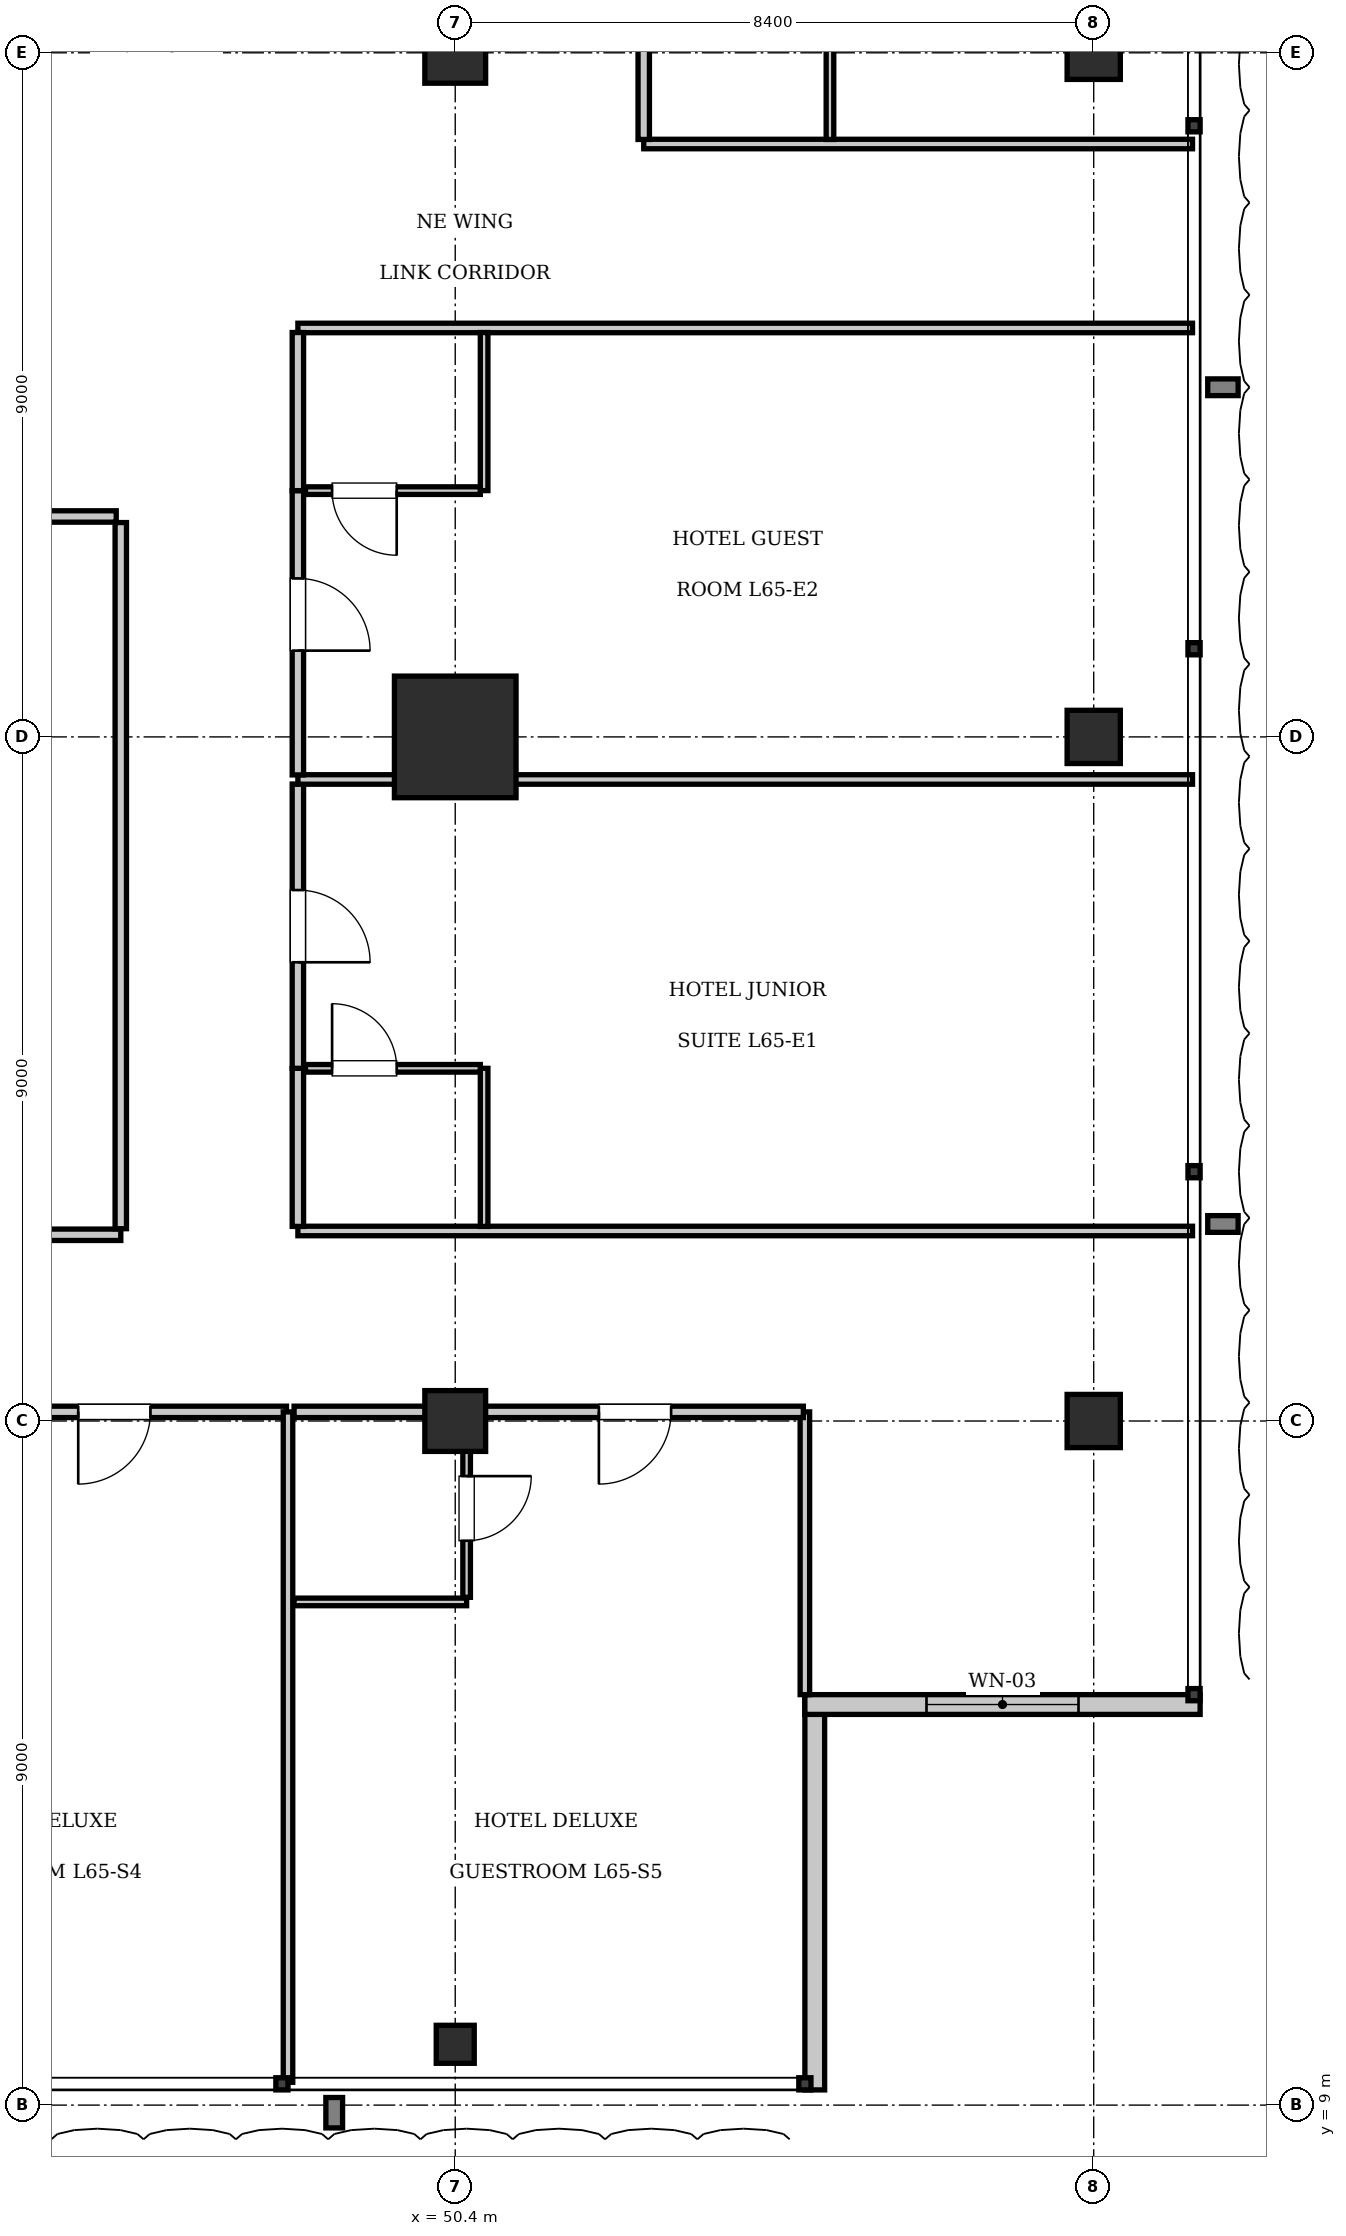
"""IFC4 building model, lengths in metres.
Left out: names, types, materials, properties, quantities, classifications, styles, units other than length and angle.
Written with IfcOpenShell. Run it as: python <this file> out.ifc"""

import sys

from ifc_helpers import new_model, si_unit, direction, frame, frame_2d, origin, origin_2d, place, context, subcontext, project, spatial, rectangle, i_section, extrude, element, fill, save


model = new_model("IFC4")
c1 = context("Model", 3, precision=1e-05, world=origin(), true_north=direction((0.0, 1.0)))
c2 = subcontext(c1, "Body", "Model", "MODEL_VIEW")
j1 = project(units=[si_unit("LENGTHUNIT", "METRE"), si_unit("PLANEANGLEUNIT", "RADIAN")], contexts=[c1])
p1 = place(None, origin())
s1 = spatial("IfcSite", under=j1, at=p1, CompositionType="ELEMENT")
p2 = place(p1, origin())
s2 = spatial("IfcBuilding", under=s1, at=p2, CompositionType="ELEMENT")
p3 = place(p2, frame((0.0, 0.0, 266.35)))
s3 = spatial("IfcBuildingStorey", under=s2, at=p3, CompositionType="ELEMENT", Elevation=266.35)
p4 = place(p3, frame((50.4, 27.0, 0.0), z_axis=(0.0, 0.0, 1.0), x_axis=(1.0, 0.0, 0.0)))
e1 = element("IfcColumn", 1, at=p4, inside=s3, PredefinedType="COLUMN", context=c2, shape_type="SweptSolid", body=[
    extrude(rectangle(XDim=1.6, YDim=1.6, at=origin_2d()), origin(), (0.0, 0.0, 1.0), 3.85),
])
for number, where, z_axis, x_axis in (
    (2, (50.4, 36.0, 0.0), (0.0, 0.0, 1.0), (1.0, 0.0, 0.0)),
    (3, (50.4, 18.0, 0.0), (0.0, 0.0, 1.0), (1.0, 0.0, 0.0)),
):
    element("IfcColumn", number, at=place(p3, frame(where, z_axis=z_axis, x_axis=x_axis)), inside=s3, PredefinedType="COLUMN", context=c2, shape_type="SweptSolid", body=[
        extrude(rectangle(XDim=0.8, YDim=0.8, at=origin_2d()), origin(), (0.0, 0.0, 1.0), 3.85),
    ])
for number, where, z_axis, x_axis in (
    (4, (58.8, 18.0, 0.0), (0.0, 0.0, 1.0), (1.0, 0.0, 0.0)),
    (5, (58.8, 27.0, 0.0), (0.0, 0.0, 1.0), (1.0, 0.0, 0.0)),
    (6, (58.8, 36.0, 0.0), (0.0, 0.0, 1.0), (1.0, 0.0, 0.0)),
):
    element("IfcColumn", number, at=place(p3, frame(where, z_axis=z_axis, x_axis=x_axis)), inside=s3, PredefinedType="COLUMN", context=c2, shape_type="SweptSolid", body=[
        extrude(rectangle(XDim=0.7, YDim=0.7, at=origin_2d()), origin(), (0.0, 0.0, 1.0), 3.85),
    ])
p5 = place(p3, frame((50.4, 9.8, 0.0), z_axis=(0.0, 0.0, 1.0), x_axis=(1.0, 0.0, 0.0)))
e7 = element("IfcColumn", 7, at=p5, inside=s3, PredefinedType="COLUMN", context=c2, shape_type="SweptSolid", body=[
    extrude(i_section(OverallWidth=0.5, OverallDepth=0.5, WebThickness=0.022, FlangeThickness=0.032, at=origin_2d()), origin(), (0.0, 0.0, 1.0), 3.85),
])
p6 = place(p3, frame((55.13, 14.4, 0.0), z_axis=(0.0, 0.0, 1.0), x_axis=(0.0, -1.0, 0.0)))
e8 = element("IfcWall", 8, at=p6, inside=s3, PredefinedType="SOLIDWALL", context=c2, shape_type="SweptSolid", body=[
    extrude(rectangle(XDim=5.2, YDim=0.26, at=frame_2d((2.6, 0.0))), origin(), (0.0, 0.0, 1.0), 3.61),
])
p7 = place(p3, frame((60.2, 14.27, 0.0), z_axis=(0.0, 0.0, 1.0), x_axis=(-1.0, 0.0, 0.0)))
e9 = element("IfcWall", 9, at=p7, inside=s3, PredefinedType="SOLIDWALL", context=c2, shape_type="SweptSolid", body=[
    extrude(rectangle(XDim=5.2, YDim=0.26, at=frame_2d((2.6, 0.0))), origin(), (0.0, 0.0, 1.0), 3.61),
])
p8 = place(p7, frame((1.6, 0.0, 0.9)))
e10 = element("IfcOpeningElement", 10, at=p8, cuts=e9, PredefinedType="OPENING", context=c2, shape_type="SweptSolid", body=[
    extrude(rectangle(XDim=2.0, YDim=2.2, at=frame_2d((1.0, 1.1))), frame((0.0, 0.14, 0.0), z_axis=(0.0, -1.0, 0.0), x_axis=(1.0, 0.0, 0.0)), (0.0, 0.0, 1.0), 0.28),
])
p9 = place(p3, frame((29.65, 20.45, 0.0), z_axis=(0.0, 0.0, 1.0), x_axis=(1.0, 0.0, 0.0)))
e11 = element("IfcWall", 11, at=p9, inside=s3, PredefinedType="PARTITIONING", context=c2, shape_type="SweptSolid", body=[
    extrude(rectangle(XDim=16.35, YDim=0.15, at=frame_2d((8.175, 0.0))), origin(), (0.0, 0.0, 1.0), 3.61),
])
p10 = place(p3, frame((46.0, 20.53, 0.0), z_axis=(0.0, 0.0, 1.0), x_axis=(0.0, 1.0, 0.0)))
e12 = element("IfcWall", 12, at=p10, inside=s3, PredefinedType="PARTITIONING", context=c2, shape_type="SweptSolid", body=[
    extrude(rectangle(XDim=9.29, YDim=0.15, at=frame_2d((4.645, 0.0))), origin(), (0.0, 0.0, 1.0), 3.61),
])
p11 = place(p3, frame((40.471, 29.9, 0.0), z_axis=(0.0, 0.0, 1.0), x_axis=(1.0, 0.0, 0.0)))
e13 = element("IfcWall", 13, at=p11, inside=s3, PredefinedType="PARTITIONING", context=c2, shape_type="SweptSolid", body=[
    extrude(rectangle(XDim=5.469, YDim=0.15, at=frame_2d((2.734, 0.0))), origin(), (0.0, 0.0, 1.0), 3.61),
])
p12 = place(p11, frame((2.284, 0.0, 0.0)))
e14 = element("IfcOpeningElement", 14, at=p12, cuts=e13, PredefinedType="OPENING", context=c2, shape_type="SweptSolid", body=[
    extrude(rectangle(XDim=0.9, YDim=2.1, at=frame_2d((0.45, 1.05))), frame((0.0, 0.085, 0.0), z_axis=(0.0, -1.0, 0.0), x_axis=(1.0, 0.0, 0.0)), (0.0, 0.0, 1.0), 0.17),
])
p13 = place(p3, frame((55.0, 14.4, 0.0), z_axis=(0.0, 0.0, 1.0), x_axis=(0.0, 1.0, 0.0)))
e15 = element("IfcWall", 15, at=p13, inside=s3, PredefinedType="PARTITIONING", context=c2, shape_type="SweptSolid", body=[
    extrude(rectangle(XDim=3.72, YDim=0.125, at=frame_2d((1.86, 0.0))), origin(), (0.0, 0.0, 1.0), 3.61),
])
p14 = place(p3, frame((43.65, 18.12, 0.0), z_axis=(0.0, 0.0, 1.0), x_axis=(1.0, 0.0, 0.0)))
e16 = element("IfcWall", 16, at=p14, inside=s3, PredefinedType="PARTITIONING", context=c2, shape_type="SweptSolid", body=[
    extrude(rectangle(XDim=4.53, YDim=0.15, at=frame_2d((2.265, 0.0))), origin(), (0.0, 0.0, 1.0), 3.077),
])
p15 = place(p14, frame((1.79, 0.0, 0.0)))
e17 = element("IfcOpeningElement", 17, at=p15, cuts=e16, PredefinedType="OPENING", context=c2, shape_type="SweptSolid", body=[
    extrude(rectangle(XDim=0.95, YDim=2.15, at=frame_2d((0.475, 1.075))), frame((0.0, 0.085, 0.0), z_axis=(0.0, -1.0, 0.0), x_axis=(1.0, 0.0, 0.0)), (0.0, 0.0, 1.0), 0.17),
])
p16 = place(p3, frame((48.2, 9.3, 0.0), z_axis=(0.0, 0.0, 1.0), x_axis=(0.0, 1.0, 0.0)))
e18 = element("IfcWall", 18, at=p16, inside=s3, PredefinedType="PARTITIONING", context=c2, shape_type="SweptSolid", body=[
    extrude(rectangle(XDim=8.82, YDim=0.125, at=frame_2d((4.41, 0.0))), origin(), (0.0, 0.0, 1.0), 3.61),
])
p17 = place(p3, frame((48.28, 18.12, 0.0), z_axis=(0.0, 0.0, 1.0), x_axis=(1.0, 0.0, 0.0)))
e19 = element("IfcWall", 19, at=p17, inside=s3, PredefinedType="PARTITIONING", context=c2, shape_type="SweptSolid", body=[
    extrude(rectangle(XDim=2.27, YDim=0.15, at=frame_2d((1.135, 0.0))), origin(), (0.0, 0.0, 1.0), 3.077),
])
p18 = place(p3, frame((48.28, 15.62, 0.0), z_axis=(0.0, 0.0, 1.0), x_axis=(1.0, 0.0, 0.0)))
e20 = element("IfcWall", 20, at=p18, inside=s3, PredefinedType="PARTITIONING", context=c2, shape_type="SweptSolid", body=[
    extrude(rectangle(XDim=2.27, YDim=0.1, at=frame_2d((1.135, 0.0))), origin(), (0.0, 0.0, 1.0), 3.61),
])
p19 = place(p3, frame((50.55, 15.68, 0.0), z_axis=(0.0, 0.0, 1.0), x_axis=(0.0, 1.0, 0.0)))
e21 = element("IfcWall", 21, at=p19, inside=s3, PredefinedType="PARTITIONING", context=c2, shape_type="SweptSolid", body=[
    extrude(rectangle(XDim=2.34, YDim=0.1, at=frame_2d((1.17, 0.0))), origin(), (0.0, 0.0, 1.0), 3.61),
])
p20 = place(p19, frame((0.745, 0.0, 0.0)))
e22 = element("IfcOpeningElement", 22, at=p20, cuts=e21, PredefinedType="OPENING", context=c2, shape_type="SweptSolid", body=[
    extrude(rectangle(XDim=0.85, YDim=2.1, at=frame_2d((0.425, 1.05))), frame((0.0, 0.06, 0.0), z_axis=(0.0, -1.0, 0.0), x_axis=(1.0, 0.0, 0.0)), (0.0, 0.0, 1.0), 0.12),
])
p21 = place(p3, frame((50.55, 18.12, 0.0), z_axis=(0.0, 0.0, 1.0), x_axis=(1.0, 0.0, 0.0)))
e23 = element("IfcWall", 23, at=p21, inside=s3, PredefinedType="PARTITIONING", context=c2, shape_type="SweptSolid", body=[
    extrude(rectangle(XDim=4.43, YDim=0.15, at=frame_2d((2.215, 0.0))), origin(), (0.0, 0.0, 1.0), 3.077),
])
p22 = place(p21, frame((1.74, 0.0, 0.0)))
e24 = element("IfcOpeningElement", 24, at=p22, cuts=e23, PredefinedType="OPENING", context=c2, shape_type="SweptSolid", body=[
    extrude(rectangle(XDim=0.95, YDim=2.15, at=frame_2d((0.475, 1.075))), frame((0.0, 0.085, 0.0), z_axis=(0.0, -1.0, 0.0), x_axis=(1.0, 0.0, 0.0)), (0.0, 0.0, 1.0), 0.17),
])
for number, where, z_axis, x_axis in (
    (25, (48.33, 20.5, 0.0), (0.0, 0.0, 1.0), (1.0, 0.0, 0.0)),
    (26, (48.33, 32.38, 0.0), (0.0, 0.0, 1.0), (1.0, 0.0, 0.0)),
):
    element("IfcWall", number, at=place(p3, frame(where, z_axis=z_axis, x_axis=x_axis)), inside=s3, PredefinedType="PARTITIONING", context=c2, shape_type="SweptSolid", body=[
        extrude(rectangle(XDim=11.77, YDim=0.125, at=frame_2d((5.885, 0.0))), origin(), (0.0, 0.0, 1.0), 3.61),
    ])
p23 = place(p3, frame((48.33, 20.56, 0.0), z_axis=(0.0, 0.0, 1.0), x_axis=(0.0, 1.0, 0.0)))
e27 = element("IfcWall", 27, at=p23, inside=s3, PredefinedType="PARTITIONING", context=c2, shape_type="SweptSolid", body=[
    extrude(rectangle(XDim=2.08, YDim=0.15, at=frame_2d((1.04, 0.0))), origin(), (0.0, 0.0, 1.0), 3.61),
])
p24 = place(p3, frame((48.33, 22.64, 0.0), z_axis=(0.0, 0.0, 1.0), x_axis=(0.0, 1.0, 0.0)))
e28 = element("IfcWall", 28, at=p24, inside=s3, PredefinedType="PARTITIONING", context=c2, shape_type="SweptSolid", body=[
    extrude(rectangle(XDim=3.74, YDim=0.15, at=frame_2d((1.87, 0.0))), origin(), (0.0, 0.0, 1.0), 3.61),
])
p25 = place(p24, frame((1.395, 0.0, 0.0)))
e29 = element("IfcOpeningElement", 29, at=p25, cuts=e28, PredefinedType="OPENING", context=c2, shape_type="SweptSolid", body=[
    extrude(rectangle(XDim=0.95, YDim=2.15, at=frame_2d((0.475, 1.075))), frame((0.0, 0.085, 0.0), z_axis=(0.0, -1.0, 0.0), x_axis=(1.0, 0.0, 0.0)), (0.0, 0.0, 1.0), 0.17),
])
p26 = place(p3, frame((50.78, 20.56, 0.0), z_axis=(0.0, 0.0, 1.0), x_axis=(0.0, 1.0, 0.0)))
e30 = element("IfcWall", 30, at=p26, inside=s3, PredefinedType="PARTITIONING", context=c2, shape_type="SweptSolid", body=[
    extrude(rectangle(XDim=2.08, YDim=0.1, at=frame_2d((1.04, 0.0))), origin(), (0.0, 0.0, 1.0), 3.61),
])
p27 = place(p3, frame((48.43, 22.64, 0.0), z_axis=(0.0, 0.0, 1.0), x_axis=(1.0, 0.0, 0.0)))
e31 = element("IfcWall", 31, at=p27, inside=s3, PredefinedType="PARTITIONING", context=c2, shape_type="SweptSolid", body=[
    extrude(rectangle(XDim=2.3, YDim=0.1, at=frame_2d((1.15, 0.0))), origin(), (0.0, 0.0, 1.0), 3.61),
])
p28 = place(p27, frame((0.35, 0.0, 0.0)))
e32 = element("IfcOpeningElement", 32, at=p28, cuts=e31, PredefinedType="OPENING", context=c2, shape_type="SweptSolid", body=[
    extrude(rectangle(XDim=0.85, YDim=2.1, at=frame_2d((0.425, 1.05))), frame((0.0, 0.06, 0.0), z_axis=(0.0, -1.0, 0.0), x_axis=(1.0, 0.0, 0.0)), (0.0, 0.0, 1.0), 0.12),
])
p29 = place(p3, frame((48.33, 26.44, 0.0), z_axis=(0.0, 0.0, 1.0), x_axis=(1.0, 0.0, 0.0)))
e33 = element("IfcWall", 33, at=p29, inside=s3, PredefinedType="PARTITIONING", context=c2, shape_type="SweptSolid", body=[
    extrude(rectangle(XDim=11.77, YDim=0.125, at=frame_2d((5.885, 0.0))), origin(), (0.0, 0.0, 1.0), 3.61),
])
p30 = place(p3, frame((48.33, 26.5, 0.0), z_axis=(0.0, 0.0, 1.0), x_axis=(0.0, 1.0, 0.0)))
e34 = element("IfcWall", 34, at=p30, inside=s3, PredefinedType="PARTITIONING", context=c2, shape_type="SweptSolid", body=[
    extrude(rectangle(XDim=3.74, YDim=0.15, at=frame_2d((1.87, 0.0))), origin(), (0.0, 0.0, 1.0), 3.61),
])
p31 = place(p30, frame((1.635, 0.0, 0.0)))
e35 = element("IfcOpeningElement", 35, at=p31, cuts=e34, PredefinedType="OPENING", context=c2, shape_type="SweptSolid", body=[
    extrude(rectangle(XDim=0.95, YDim=2.15, at=frame_2d((0.475, 1.075))), frame((0.0, 0.085, 0.0), z_axis=(0.0, -1.0, 0.0), x_axis=(1.0, 0.0, 0.0)), (0.0, 0.0, 1.0), 0.17),
])
p32 = place(p3, frame((48.33, 30.24, 0.0), z_axis=(0.0, 0.0, 1.0), x_axis=(0.0, 1.0, 0.0)))
e36 = element("IfcWall", 36, at=p32, inside=s3, PredefinedType="PARTITIONING", context=c2, shape_type="SweptSolid", body=[
    extrude(rectangle(XDim=2.08, YDim=0.15, at=frame_2d((1.04, 0.0))), origin(), (0.0, 0.0, 1.0), 3.61),
])
p33 = place(p3, frame((50.78, 30.24, 0.0), z_axis=(0.0, 0.0, 1.0), x_axis=(0.0, 1.0, 0.0)))
e37 = element("IfcWall", 37, at=p33, inside=s3, PredefinedType="PARTITIONING", context=c2, shape_type="SweptSolid", body=[
    extrude(rectangle(XDim=2.08, YDim=0.1, at=frame_2d((1.04, 0.0))), origin(), (0.0, 0.0, 1.0), 3.61),
])
p34 = place(p3, frame((48.43, 30.24, 0.0), z_axis=(0.0, 0.0, 1.0), x_axis=(1.0, 0.0, 0.0)))
e38 = element("IfcWall", 38, at=p34, inside=s3, PredefinedType="PARTITIONING", context=c2, shape_type="SweptSolid", body=[
    extrude(rectangle(XDim=2.3, YDim=0.1, at=frame_2d((1.15, 0.0))), origin(), (0.0, 0.0, 1.0), 3.61),
])
p35 = place(p34, frame((0.35, 0.0, 0.0)))
e39 = element("IfcOpeningElement", 39, at=p35, cuts=e38, PredefinedType="OPENING", context=c2, shape_type="SweptSolid", body=[
    extrude(rectangle(XDim=0.85, YDim=2.1, at=frame_2d((0.425, 1.05))), frame((0.0, 0.06, 0.0), z_axis=(0.0, -1.0, 0.0), x_axis=(1.0, 0.0, 0.0)), (0.0, 0.0, 1.0), 0.12),
])
p36 = place(p3, frame((52.88, 34.8, 0.0), z_axis=(0.0, 0.0, 1.0), x_axis=(1.0, 0.0, 0.0)))
e40 = element("IfcWall", 40, at=p36, inside=s3, PredefinedType="PARTITIONING", context=c2, shape_type="SweptSolid", body=[
    extrude(rectangle(XDim=7.22, YDim=0.125, at=frame_2d((3.61, 0.0))), origin(), (0.0, 0.0, 1.0), 3.61),
])
p37 = place(p3, frame((52.88, 34.86, 0.0), z_axis=(0.0, 0.0, 1.0), x_axis=(0.0, 1.0, 0.0)))
e41 = element("IfcWall", 41, at=p37, inside=s3, PredefinedType="PARTITIONING", context=c2, shape_type="SweptSolid", body=[
    extrude(rectangle(XDim=2.29, YDim=0.15, at=frame_2d((1.145, 0.0))), origin(), (0.0, 0.0, 1.0), 3.61),
])
p38 = place(p3, frame((55.33, 34.86, 0.0), z_axis=(0.0, 0.0, 1.0), x_axis=(0.0, 1.0, 0.0)))
e42 = element("IfcWall", 42, at=p38, inside=s3, PredefinedType="PARTITIONING", context=c2, shape_type="SweptSolid", body=[
    extrude(rectangle(XDim=2.29, YDim=0.1, at=frame_2d((1.145, 0.0))), origin(), (0.0, 0.0, 1.0), 3.61),
])
p39 = place(p8, origin())
e43 = element("IfcWindow", 43, at=p39, inside=s3, PartitioningType="SINGLE_PANEL", PredefinedType="WINDOW", context=c2, shape_type="SweptSolid", body=[
    extrude(rectangle(XDim=2.0, YDim=2.2, at=frame_2d((1.0, 1.1))), frame((0.0, 0.03, 0.0), z_axis=(0.0, -1.0, 0.0), x_axis=(1.0, 0.0, 0.0)), (0.0, 0.0, 1.0), 0.06),
])
fill(e10, e43)
p40 = place(p15, frame((0.95, 0.0, 0.0), z_axis=(0.0, 0.0, 1.0), x_axis=(-1.0, 0.0, 0.0)))
e44 = element("IfcDoor", 44, at=p40, inside=s3, OperationType="SINGLE_SWING_RIGHT", PredefinedType="DOOR", context=c2, shape_type="SweptSolid", body=[
    extrude(rectangle(XDim=0.95, YDim=2.15, at=frame_2d((0.475, 1.075))), frame((0.0, 0.025, 0.0), z_axis=(0.0, -1.0, 0.0), x_axis=(1.0, 0.0, 0.0)), (0.0, 0.0, 1.0), 0.05),
])
fill(e17, e44)
p41 = place(p20, frame((0.85, 0.0, 0.0), z_axis=(0.0, 0.0, 1.0), x_axis=(-1.0, 0.0, 0.0)))
e45 = element("IfcDoor", 45, at=p41, inside=s3, OperationType="SINGLE_SWING_LEFT", PredefinedType="DOOR", context=c2, shape_type="SweptSolid", body=[
    extrude(rectangle(XDim=0.85, YDim=2.1, at=frame_2d((0.425, 1.05))), frame((0.0, 0.025, 0.0), z_axis=(0.0, -1.0, 0.0), x_axis=(1.0, 0.0, 0.0)), (0.0, 0.0, 1.0), 0.05),
])
fill(e22, e45)
p42 = place(p22, frame((0.95, 0.0, 0.0), z_axis=(0.0, 0.0, 1.0), x_axis=(-1.0, 0.0, 0.0)))
e46 = element("IfcDoor", 46, at=p42, inside=s3, OperationType="SINGLE_SWING_RIGHT", PredefinedType="DOOR", context=c2, shape_type="SweptSolid", body=[
    extrude(rectangle(XDim=0.95, YDim=2.15, at=frame_2d((0.475, 1.075))), frame((0.0, 0.025, 0.0), z_axis=(0.0, -1.0, 0.0), x_axis=(1.0, 0.0, 0.0)), (0.0, 0.0, 1.0), 0.05),
])
fill(e24, e46)
p43 = place(p28, origin())
e47 = element("IfcDoor", 47, at=p43, inside=s3, OperationType="SINGLE_SWING_LEFT", PredefinedType="DOOR", context=c2, shape_type="SweptSolid", body=[
    extrude(rectangle(XDim=0.85, YDim=2.1, at=frame_2d((0.425, 1.05))), frame((0.0, 0.025, 0.0), z_axis=(0.0, -1.0, 0.0), x_axis=(1.0, 0.0, 0.0)), (0.0, 0.0, 1.0), 0.05),
])
fill(e32, e47)
p44 = place(p25, frame((0.95, 0.0, 0.0), z_axis=(0.0, 0.0, 1.0), x_axis=(-1.0, 0.0, 0.0)))
e48 = element("IfcDoor", 48, at=p44, inside=s3, OperationType="SINGLE_SWING_RIGHT", PredefinedType="DOOR", context=c2, shape_type="SweptSolid", body=[
    extrude(rectangle(XDim=0.95, YDim=2.15, at=frame_2d((0.475, 1.075))), frame((0.0, 0.025, 0.0), z_axis=(0.0, -1.0, 0.0), x_axis=(1.0, 0.0, 0.0)), (0.0, 0.0, 1.0), 0.05),
])
fill(e29, e48)
p45 = place(p35, frame((0.85, 0.0, 0.0), z_axis=(0.0, 0.0, 1.0), x_axis=(-1.0, 0.0, 0.0)))
e49 = element("IfcDoor", 49, at=p45, inside=s3, OperationType="SINGLE_SWING_LEFT", PredefinedType="DOOR", context=c2, shape_type="SweptSolid", body=[
    extrude(rectangle(XDim=0.85, YDim=2.1, at=frame_2d((0.425, 1.05))), frame((0.0, 0.025, 0.0), z_axis=(0.0, -1.0, 0.0), x_axis=(1.0, 0.0, 0.0)), (0.0, 0.0, 1.0), 0.05),
])
fill(e39, e49)
p46 = place(p31, frame((0.95, 0.0, 0.0), z_axis=(0.0, 0.0, 1.0), x_axis=(-1.0, 0.0, 0.0)))
e50 = element("IfcDoor", 50, at=p46, inside=s3, OperationType="SINGLE_SWING_RIGHT", PredefinedType="DOOR", context=c2, shape_type="SweptSolid", body=[
    extrude(rectangle(XDim=0.95, YDim=2.15, at=frame_2d((0.475, 1.075))), frame((0.0, 0.025, 0.0), z_axis=(0.0, -1.0, 0.0), x_axis=(1.0, 0.0, 0.0)), (0.0, 0.0, 1.0), 0.05),
])
fill(e35, e50)
save(model, sys.argv[1])
